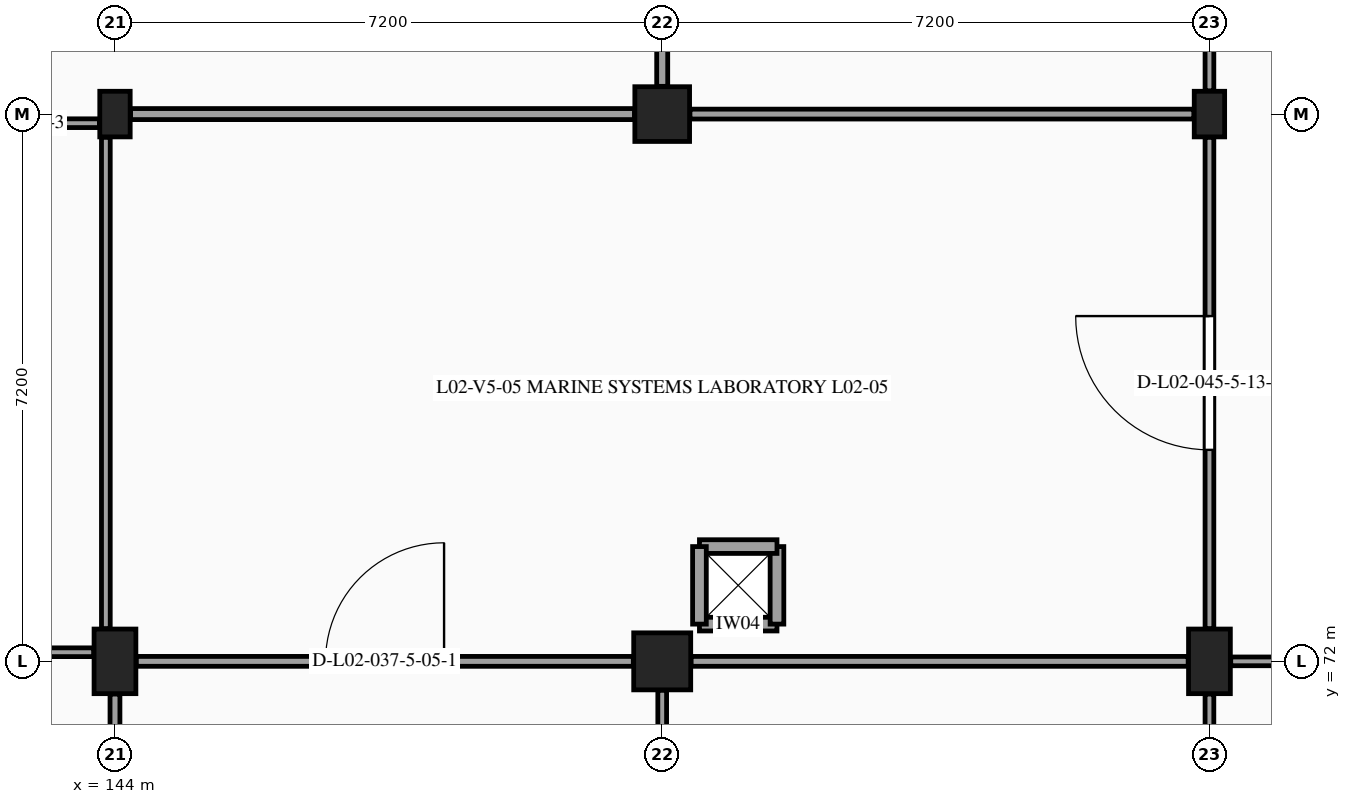
"""IFC4 building model, lengths in metres.
Left out: names, types, materials, properties, quantities, classifications, styles, units other than length and angle.
Written with IfcOpenShell. Run it as: python <this file> out.ifc"""

import sys

from ifc_helpers import new_model, si_unit, direction, frame, frame_2d, origin, origin_2d, place, context, subcontext, project, spatial, rectangle, extrude, element, fill, save


model = new_model("IFC4")
c1 = context("Model", 3, precision=1e-05, world=origin(), true_north=direction((0.0, 1.0)))
c2 = subcontext(c1, "Body", "Model", "MODEL_VIEW")
j1 = project(units=[si_unit("LENGTHUNIT", "METRE"), si_unit("PLANEANGLEUNIT", "RADIAN")], contexts=[c1])
p1 = place(None, origin())
s1 = spatial("IfcSite", under=j1, at=p1, CompositionType="ELEMENT")
p2 = place(p1, origin())
s2 = spatial("IfcBuilding", under=s1, at=p2, CompositionType="ELEMENT")
p3 = place(p2, frame((0.0, 0.0, 9.9)))
s3 = spatial("IfcBuildingStorey", under=s2, at=p3, CompositionType="ELEMENT", Elevation=9.9)
p4 = place(p3, frame((144.0, 72.0, 0.0), z_axis=(0.0, 0.0, 1.0), x_axis=(1.0, 0.0, 0.0)))
e1 = element("IfcColumn", 1, at=p4, inside=s3, PredefinedType="COLUMN", context=c2, shape_type="SweptSolid", body=[
    extrude(rectangle(XDim=0.55, YDim=0.85, at=origin_2d()), origin(), (0.0, 0.0, 1.0), 4.5),
])
p5 = place(p3, frame((144.0, 79.2, 0.0), z_axis=(0.0, 0.0, 1.0), x_axis=(1.0, 0.0, 0.0)))
e2 = element("IfcColumn", 2, at=p5, inside=s3, PredefinedType="PILASTER", context=c2, shape_type="SweptSolid", body=[
    extrude(rectangle(XDim=0.4, YDim=0.6, at=origin_2d()), origin(), (0.0, 0.0, 1.0), 4.5),
])
p6 = place(p3, frame((151.2, 72.0, 0.0), z_axis=(0.0, 0.0, 1.0), x_axis=(1.0, 0.0, 0.0)))
e3 = element("IfcColumn", 3, at=p6, inside=s3, PredefinedType="COLUMN", context=c2, shape_type="SweptSolid", body=[
    extrude(rectangle(XDim=0.75, YDim=0.75, at=origin_2d()), origin(), (0.0, 0.0, 1.0), 4.5),
])
p7 = place(p3, frame((151.2, 79.2, 0.0), z_axis=(0.0, 0.0, 1.0), x_axis=(1.0, 0.0, 0.0)))
e4 = element("IfcColumn", 4, at=p7, inside=s3, PredefinedType="COLUMN", context=c2, shape_type="SweptSolid", body=[
    extrude(rectangle(XDim=0.72, YDim=0.72, at=origin_2d()), origin(), (0.0, 0.0, 1.0), 4.5),
])
p8 = place(p3, frame((158.4, 72.0, 0.0), z_axis=(0.0, 0.0, 1.0), x_axis=(1.0, 0.0, 0.0)))
e5 = element("IfcColumn", 5, at=p8, inside=s3, PredefinedType="COLUMN", context=c2, shape_type="SweptSolid", body=[
    extrude(rectangle(XDim=0.55, YDim=0.85, at=origin_2d()), origin(), (0.0, 0.0, 1.0), 4.5),
])
p9 = place(p3, frame((158.4, 79.2, 0.0), z_axis=(0.0, 0.0, 1.0), x_axis=(1.0, 0.0, 0.0)))
e6 = element("IfcColumn", 6, at=p9, inside=s3, PredefinedType="PILASTER", context=c2, shape_type="SweptSolid", body=[
    extrude(rectangle(XDim=0.4, YDim=0.6, at=origin_2d()), origin(), (0.0, 0.0, 1.0), 4.5),
])
p10 = place(p3, frame((137.18, 72.12, 0.0), z_axis=(0.0, 0.0, 1.0), x_axis=(1.0, 0.0, 0.0)))
e7 = element("IfcWall", 7, at=p10, inside=s3, PredefinedType="PARTITIONING", context=c2, shape_type="SweptSolid", body=[
    extrude(rectangle(XDim=6.54, YDim=0.115, at=frame_2d((3.27, 0.0))), origin(), (0.0, 0.0, 1.0), 3.475),
])
p11 = place(p3, frame((137.165, 79.08, 0.0), z_axis=(0.0, 0.0, 1.0), x_axis=(1.0, 0.0, 0.0)))
e8 = element("IfcWall", 8, at=p11, inside=s3, PredefinedType="PARTITIONING", context=c2, shape_type="SweptSolid", body=[
    extrude(rectangle(XDim=6.63, YDim=0.115, at=frame_2d((3.315, 0.0))), origin(), (0.0, 0.0, 1.0), 3.475),
])
p12 = place(p11, frame((0.635, 0.0, 0.0)))
e9 = element("IfcOpeningElement", 9, at=p12, cuts=e8, PredefinedType="OPENING", context=c2, shape_type="SweptSolid", body=[
    extrude(rectangle(XDim=0.95, YDim=2.1, at=frame_2d((0.475, 1.05))), frame((0.0, 0.067, 0.0), z_axis=(0.0, -1.0, 0.0), x_axis=(1.0, 0.0, 0.0)), (0.0, 0.0, 1.0), 0.135),
])
p13 = place(p11, frame((2.735, 0.0, 0.0)))
e10 = element("IfcOpeningElement", 10, at=p13, cuts=e8, PredefinedType="OPENING", context=c2, shape_type="SweptSolid", body=[
    extrude(rectangle(XDim=0.95, YDim=2.1, at=frame_2d((0.475, 1.05))), frame((0.0, 0.067, 0.0), z_axis=(0.0, -1.0, 0.0), x_axis=(1.0, 0.0, 0.0)), (0.0, 0.0, 1.0), 0.135),
])
p14 = place(p11, frame((4.885, 0.0, 0.0)))
e11 = element("IfcOpeningElement", 11, at=p14, cuts=e8, PredefinedType="OPENING", context=c2, shape_type="SweptSolid", body=[
    extrude(rectangle(XDim=1.0, YDim=2.15, at=frame_2d((0.5, 1.075))), frame((0.0, 0.067, 0.0), z_axis=(0.0, -1.0, 0.0), x_axis=(1.0, 0.0, 0.0)), (0.0, 0.0, 1.0), 0.135),
])
p15 = place(p3, frame((143.88, 72.43, 0.0), z_axis=(0.0, 0.0, 1.0), x_axis=(0.0, 1.0, 0.0)))
e12 = element("IfcWall", 12, at=p15, inside=s3, PredefinedType="PARTITIONING", context=c2, shape_type="SweptSolid", body=[
    extrude(rectangle(XDim=6.465, YDim=0.115, at=frame_2d((3.232, 0.0))), origin(), (0.0, 0.0, 1.0), 3.53),
])
for number, where, z_axis, x_axis in (
    (13, (151.69, 72.49, 0.0), (0.0, 0.0, 1.0), (1.0, 0.0, 0.0)),
    (14, (152.71, 72.49, 0.0), (0.0, 0.0, 1.0), (0.0, 1.0, 0.0)),
    (15, (152.71, 73.51, 0.0), (0.0, 0.0, 1.0), (-1.0, 0.0, 0.0)),
    (16, (151.69, 73.51, 0.0), (0.0, 0.0, 1.0), (0.0, -1.0, 0.0)),
):
    element("IfcWall", number, at=place(p3, frame(where, z_axis=z_axis, x_axis=x_axis)), inside=s3, PredefinedType="PARTITIONING", context=c2, shape_type="SweptSolid", body=[
        extrude(rectangle(XDim=1.02, YDim=0.18, at=frame_2d((0.51, 0.0))), origin(), (0.0, 0.0, 1.0), 4.225),
    ])
p16 = place(p3, frame((144.0, 65.155, 0.0), z_axis=(0.0, 0.0, 1.0), x_axis=(0.0, 1.0, 0.0)))
e17 = element("IfcWall", 17, at=p16, inside=s3, PredefinedType="PARTITIONING", context=c2, shape_type="SweptSolid", body=[
    extrude(rectangle(XDim=6.415, YDim=0.13, at=frame_2d((3.208, 0.0))), origin(), (0.0, 0.0, 1.0), 3.53),
])
p17 = place(p3, frame((151.2, 65.195, 0.0), z_axis=(0.0, 0.0, 1.0), x_axis=(0.0, 1.0, 0.0)))
e18 = element("IfcWall", 18, at=p17, inside=s3, PredefinedType="PARTITIONING", context=c2, shape_type="SweptSolid", body=[
    extrude(rectangle(XDim=6.425, YDim=0.115, at=frame_2d((3.212, 0.0))), origin(), (0.0, 0.0, 1.0), 3.53),
])
p18 = place(p3, frame((144.28, 72.0, 0.0), z_axis=(0.0, 0.0, 1.0), x_axis=(1.0, 0.0, 0.0)))
e19 = element("IfcWall", 19, at=p18, inside=s3, PredefinedType="PARTITIONING", context=c2, shape_type="SweptSolid", body=[
    extrude(rectangle(XDim=6.54, YDim=0.13, at=frame_2d((3.27, 0.0))), origin(), (0.0, 0.0, 1.0), 3.485),
])
p19 = place(p18, frame((2.49, 0.0, 0.0)))
e20 = element("IfcOpeningElement", 20, at=p19, cuts=e19, PredefinedType="OPENING", context=c2, shape_type="SweptSolid", body=[
    extrude(rectangle(XDim=1.56, YDim=2.25, at=frame_2d((0.78, 1.125))), frame((0.0, 0.075, 0.0), z_axis=(0.0, -1.0, 0.0), x_axis=(1.0, 0.0, 0.0)), (0.0, 0.0, 1.0), 0.15),
])
p20 = place(p3, frame((144.205, 79.2, 0.0), z_axis=(0.0, 0.0, 1.0), x_axis=(1.0, 0.0, 0.0)))
e21 = element("IfcWall", 21, at=p20, inside=s3, PredefinedType="PARTITIONING", context=c2, shape_type="SweptSolid", body=[
    extrude(rectangle(XDim=6.63, YDim=0.145, at=frame_2d((3.315, 0.0))), origin(), (0.0, 0.0, 1.0), 3.485),
])
p21 = place(p3, frame((151.2, 79.565, 0.0), z_axis=(0.0, 0.0, 1.0), x_axis=(0.0, 1.0, 0.0)))
e22 = element("IfcWall", 22, at=p21, inside=s3, PredefinedType="PARTITIONING", context=c2, shape_type="SweptSolid", body=[
    extrude(rectangle(XDim=6.48, YDim=0.145, at=frame_2d((3.24, 0.0))), origin(), (0.0, 0.0, 1.0), 3.595),
])
p22 = place(p21, frame((2.6, 0.0, 0.0)))
e23 = element("IfcOpeningElement", 23, at=p22, cuts=e22, PredefinedType="OPENING", context=c2, shape_type="SweptSolid", body=[
    extrude(rectangle(XDim=1.28, YDim=2.24, at=frame_2d((0.64, 1.12))), frame((0.0, 0.083, 0.0), z_axis=(0.0, -1.0, 0.0), x_axis=(1.0, 0.0, 0.0)), (0.0, 0.0, 1.0), 0.165),
])
p23 = place(p3, frame((158.4, 65.155, 0.0), z_axis=(0.0, 0.0, 1.0), x_axis=(0.0, 1.0, 0.0)))
e24 = element("IfcWall", 24, at=p23, inside=s3, PredefinedType="PARTITIONING", context=c2, shape_type="SweptSolid", body=[
    extrude(rectangle(XDim=6.415, YDim=0.115, at=frame_2d((3.208, 0.0))), origin(), (0.0, 0.0, 1.0), 3.53),
])
p24 = place(p3, frame((151.58, 72.0, 0.0), z_axis=(0.0, 0.0, 1.0), x_axis=(1.0, 0.0, 0.0)))
e25 = element("IfcWall", 25, at=p24, inside=s3, PredefinedType="PARTITIONING", context=c2, shape_type="SweptSolid", body=[
    extrude(rectangle(XDim=6.54, YDim=0.13, at=frame_2d((3.27, 0.0))), origin(), (0.0, 0.0, 1.0), 3.5),
])
p25 = place(p3, frame((158.4, 72.43, 0.0), z_axis=(0.0, 0.0, 1.0), x_axis=(0.0, 1.0, 0.0)))
e26 = element("IfcWall", 26, at=p25, inside=s3, PredefinedType="PARTITIONING", context=c2, shape_type="SweptSolid", body=[
    extrude(rectangle(XDim=6.465, YDim=0.115, at=frame_2d((3.232, 0.0))), origin(), (0.0, 0.0, 1.0), 3.53),
])
p26 = place(p25, frame((2.353, 0.0, 0.0)))
e27 = element("IfcOpeningElement", 27, at=p26, cuts=e26, PredefinedType="OPENING", context=c2, shape_type="SweptSolid", body=[
    extrude(rectangle(XDim=1.76, YDim=2.3, at=frame_2d((0.88, 1.15))), frame((0.0, 0.067, 0.0), z_axis=(0.0, -1.0, 0.0), x_axis=(1.0, 0.0, 0.0)), (0.0, 0.0, 1.0), 0.135),
])
p27 = place(p3, frame((151.565, 79.2, 0.0), z_axis=(0.0, 0.0, 1.0), x_axis=(1.0, 0.0, 0.0)))
e28 = element("IfcWall", 28, at=p27, inside=s3, PredefinedType="PARTITIONING", context=c2, shape_type="SweptSolid", body=[
    extrude(rectangle(XDim=6.63, YDim=0.13, at=frame_2d((3.315, 0.0))), origin(), (0.0, 0.0, 1.0), 3.5),
])
p28 = place(p3, frame((158.4, 79.505, 0.0), z_axis=(0.0, 0.0, 1.0), x_axis=(0.0, 1.0, 0.0)))
e29 = element("IfcWall", 29, at=p28, inside=s3, PredefinedType="PARTITIONING", context=c2, shape_type="SweptSolid", body=[
    extrude(rectangle(XDim=6.5, YDim=0.115, at=frame_2d((3.25, 0.0))), origin(), (0.0, 0.0, 1.0), 3.595),
])
p29 = place(p3, frame((158.68, 72.0, 0.0), z_axis=(0.0, 0.0, 1.0), x_axis=(1.0, 0.0, 0.0)))
e30 = element("IfcWall", 30, at=p29, inside=s3, PredefinedType="PARTITIONING", context=c2, shape_type="SweptSolid", body=[
    extrude(rectangle(XDim=6.54, YDim=0.115, at=frame_2d((3.27, 0.0))), origin(), (0.0, 0.0, 1.0), 3.505),
])
p30 = place(p19, origin())
e31 = element("IfcDoor", 31, at=p30, inside=s3, OperationType="SINGLE_SWING_RIGHT", PredefinedType="DOOR", context=c2, shape_type="SweptSolid", body=[
    extrude(rectangle(XDim=1.56, YDim=2.25, at=frame_2d((0.78, 1.125))), frame((0.0, 0.025, 0.0), z_axis=(0.0, -1.0, 0.0), x_axis=(1.0, 0.0, 0.0)), (0.0, 0.0, 1.0), 0.05),
])
fill(e20, e31)
p31 = place(p26, origin())
e32 = element("IfcDoor", 32, at=p31, inside=s3, OperationType="SINGLE_SWING_RIGHT", PredefinedType="DOOR", context=c2, shape_type="SweptSolid", body=[
    extrude(rectangle(XDim=1.76, YDim=2.3, at=frame_2d((0.88, 1.15))), frame((0.0, 0.025, 0.0), z_axis=(0.0, -1.0, 0.0), x_axis=(1.0, 0.0, 0.0)), (0.0, 0.0, 1.0), 0.05),
])
fill(e27, e32)
save(model, sys.argv[1])
